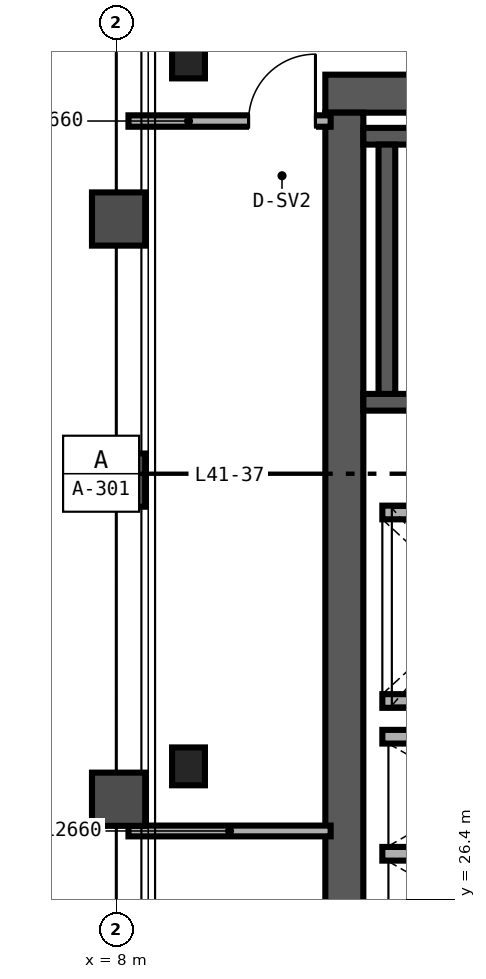
"""IFC4 building model, lengths in metres.
Left out: names, types, materials, properties, quantities, classifications, styles, units other than length and angle.
Written with IfcOpenShell. Run it as: python <this file> out.ifc"""

import sys

from ifc_helpers import new_model, si_unit, direction, frame, frame_2d, origin, origin_2d, place, context, subcontext, project, spatial, rectangle, i_section, extrude, source, transform, mapped, element, fill, save


model = new_model("IFC4")
c1 = context("Model", 3, precision=1e-05, world=origin(), true_north=direction((0.0, 1.0)))
c2 = subcontext(c1, "Body", "Model", "MODEL_VIEW")
j1 = project(units=[si_unit("LENGTHUNIT", "METRE"), si_unit("PLANEANGLEUNIT", "RADIAN")], contexts=[c1])
p1 = place(None, origin())
s1 = spatial("IfcSite", under=j1, at=p1, CompositionType="ELEMENT")
p2 = place(p1, origin())
s2 = spatial("IfcBuilding", under=s1, at=p2, CompositionType="ELEMENT")
p3 = place(p2, frame((0.0, 0.0, 166.8)))
s3 = spatial("IfcBuildingStorey", under=s2, at=p3, CompositionType="ELEMENT", Elevation=166.8)
p4 = place(p3, frame((10.75, 37.0, 0.0), z_axis=(0.0, 0.0, 1.0), x_axis=(1.0, 0.0, 0.0)))
e1 = element("IfcWall", 1, at=p4, inside=s3, PredefinedType="SHEAR", context=c2, shape_type="SweptSolid", body=[
    extrude(rectangle(XDim=12.5, YDim=0.5, at=frame_2d((6.25, 0.0))), origin(), (0.0, 0.0, 1.0), 3.37),
])
p5 = place(p4, frame((8.83, 0.0, 0.0)))
e2 = element("IfcOpeningElement", 2, at=p5, cuts=e1, PredefinedType="OPENING", context=c2, shape_type="SweptSolid", body=[
    extrude(rectangle(XDim=1.0, YDim=2.15, at=frame_2d((0.5, 1.075))), frame((0.0, 0.26, 0.0), z_axis=(0.0, -1.0, 0.0), x_axis=(1.0, 0.0, 0.0)), (0.0, 0.0, 1.0), 0.52),
])
p6 = place(p3, frame((11.0, 15.25, 0.0), z_axis=(0.0, 0.0, 1.0), x_axis=(0.0, 1.0, 0.0)))
e3 = element("IfcWall", 3, at=p6, inside=s3, PredefinedType="SHEAR", context=c2, shape_type="SweptSolid", body=[
    extrude(rectangle(XDim=21.5, YDim=0.5, at=frame_2d((10.75, 0.0))), origin(), (0.0, 0.0, 1.0), 3.37),
])
p7 = place(p3, frame((11.25, 32.94, 0.0), z_axis=(0.0, 0.0, 1.0), x_axis=(1.0, 0.0, 0.0)))
e4 = element("IfcWall", 4, at=p7, inside=s3, PredefinedType="SHEAR", context=c2, shape_type="SweptSolid", body=[
    extrude(rectangle(XDim=8.06, YDim=0.22, at=frame_2d((4.03, 0.0))), origin(), (0.0, 0.0, 1.0), 3.4),
])
p8 = place(p7, frame((0.67, 0.0, 0.0)))
e5 = element("IfcOpeningElement", 5, at=p8, cuts=e4, PredefinedType="OPENING", context=c2, shape_type="SweptSolid", body=[
    extrude(rectangle(XDim=1.05, YDim=2.15, at=frame_2d((0.525, 1.075))), frame((0.0, 0.12, 0.0), z_axis=(0.0, -1.0, 0.0), x_axis=(1.0, 0.0, 0.0)), (0.0, 0.0, 1.0), 0.24),
])
p9 = place(p3, frame((11.25, 36.44, 0.0), z_axis=(0.0, 0.0, 1.0), x_axis=(1.0, 0.0, 0.0)))
e6 = element("IfcWall", 6, at=p9, inside=s3, PredefinedType="SHEAR", context=c2, shape_type="SweptSolid", body=[
    extrude(rectangle(XDim=8.06, YDim=0.22, at=frame_2d((4.03, 0.0))), origin(), (0.0, 0.0, 1.0), 3.4),
])
p10 = place(p3, frame((11.56, 33.05, 0.0), z_axis=(0.0, 0.0, 1.0), x_axis=(0.0, 1.0, 0.0)))
e7 = element("IfcWall", 7, at=p10, inside=s3, PredefinedType="SHEAR", context=c2, shape_type="SweptSolid", body=[
    extrude(rectangle(XDim=3.28, YDim=0.22, at=frame_2d((1.64, 0.0))), origin(), (0.0, 0.0, 1.0), 3.4),
])
m1 = source(origin(), c2, "Body", "SweptSolid", [
    extrude(i_section(OverallWidth=0.432, OverallDepth=0.498, WebThickness=0.056, FlangeThickness=0.089, FilletRadius=0.025, at=origin_2d()), origin(), (0.0, 0.0, 1.0), 3.37),
])
for number, where, z_axis, x_axis in (
    (8, (8.95, 28.15, 0.0), (0.0, 0.0, 1.0), (1.0, 0.0, 0.0)),
    (9, (8.95, 37.45, 0.0), (0.0, 0.0, 1.0), (1.0, 0.0, 0.0)),
):
    element("IfcColumn", number, at=place(p3, frame(where, z_axis=z_axis, x_axis=x_axis)), inside=s3, PredefinedType="COLUMN", context=c2, shape_type="MappedRepresentation", body=[
        mapped(m1, transform((0.0, 0.0, 0.0), scale=1.0)),
    ])
for number, where, z_axis, x_axis in (
    (10, (11.5, 29.01, 0.0), (0.0, 0.0, 1.0), (1.0, 0.0, 0.0)),
    (11, (11.5, 31.49, 0.0), (0.0, 0.0, 1.0), (1.0, 0.0, 0.0)),
):
    element("IfcWall", number, at=place(p3, frame(where, z_axis=z_axis, x_axis=x_axis)), inside=s3, PredefinedType="SOLIDWALL", context=c2, shape_type="SweptSolid", body=[
        extrude(rectangle(XDim=2.5, YDim=0.18, at=frame_2d((1.25, 0.0))), origin(), (0.0, 0.0, 1.0), 3.37),
    ])
for number, where, z_axis, x_axis in (
    (12, (11.5, 27.0, 0.0), (0.0, 0.0, 1.0), (1.0, 0.0, 0.0)),
    (13, (11.5, 28.54, 0.0), (0.0, 0.0, 1.0), (1.0, 0.0, 0.0)),
):
    element("IfcWall", number, at=place(p3, frame(where, z_axis=z_axis, x_axis=x_axis)), inside=s3, PredefinedType="SOLIDWALL", context=c2, shape_type="SweptSolid", body=[
        extrude(rectangle(XDim=2.51, YDim=0.18, at=frame_2d((1.255, 0.0))), origin(), (0.0, 0.0, 1.0), 3.37),
    ])
p11 = place(p3, frame((8.16, 36.64, 0.0), z_axis=(0.0, 0.0, 1.0), x_axis=(1.0, 0.0, 0.0)))
e14 = element("IfcWall", 14, at=p11, inside=s3, PredefinedType="PARTITIONING", context=c2, shape_type="SweptSolid", body=[
    extrude(rectangle(XDim=2.66, YDim=0.15, at=frame_2d((1.33, 0.0))), origin(), (0.0, 0.0, 1.0), 2.753),
])
p12 = place(p11, frame((1.58, 0.0, 0.0)))
e15 = element("IfcOpeningElement", 15, at=p12, cuts=e14, PredefinedType="OPENING", context=c2, shape_type="SweptSolid", body=[
    extrude(rectangle(XDim=0.88, YDim=2.15, at=frame_2d((0.44, 1.075))), frame((0.0, 0.085, 0.0), z_axis=(0.0, -1.0, 0.0), x_axis=(1.0, 0.0, 0.0)), (0.0, 0.0, 1.0), 0.17),
])
p13 = place(p3, frame((8.16, 27.3, 0.0), z_axis=(0.0, 0.0, 1.0), x_axis=(1.0, 0.0, 0.0)))
e16 = element("IfcWall", 16, at=p13, inside=s3, PredefinedType="PARTITIONING", context=c2, shape_type="SweptSolid", body=[
    extrude(rectangle(XDim=2.66, YDim=0.142, at=frame_2d((1.33, 0.0))), origin(), (0.0, 0.0, 1.0), 2.591),
])
m2 = source(origin(), c2, "Body", "SweptSolid", [
    extrude(rectangle(XDim=0.88, YDim=2.15, at=frame_2d((0.44, 1.075))), frame((0.0, 0.025, 0.0), z_axis=(0.0, -1.0, 0.0), x_axis=(1.0, 0.0, 0.0)), (0.0, 0.0, 1.0), 0.05),
])
p14 = place(p12, origin())
e17 = element("IfcDoor", 17, at=p14, inside=s3, OperationType="SINGLE_SWING_RIGHT", PredefinedType="DOOR", context=c2, shape_type="MappedRepresentation", body=[
    mapped(m2, transform((0.0, 0.0, 0.0), scale=1.0)),
])
fill(e15, e17)
save(model, sys.argv[1])
